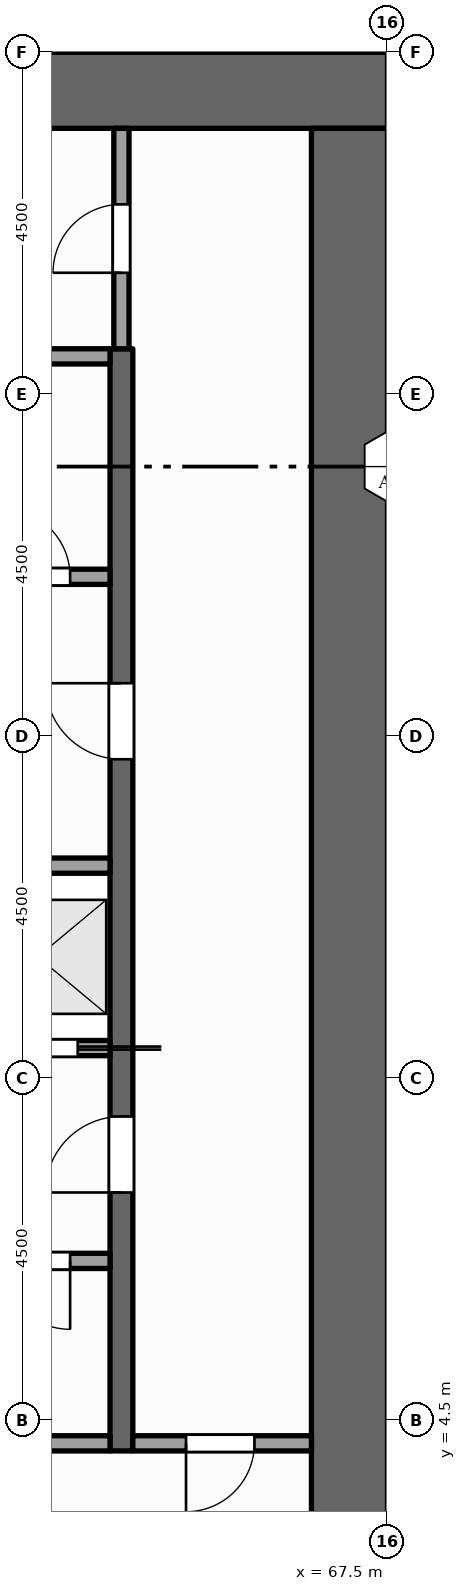
"""IFC4 building model, lengths in metres.
Left out: names, types, materials, properties, quantities, classifications, styles, units other than length and angle.
Written with IfcOpenShell. Run it as: python <this file> out.ifc"""

import sys

from ifc_helpers import new_model, si_unit, direction, frame, frame_2d, origin, place, context, subcontext, project, spatial, rectangle, extrude, element, fill, save


model = new_model("IFC4")
c1 = context("Model", 3, precision=1e-05, world=origin(), true_north=direction((0.0, 1.0)))
c2 = subcontext(c1, "Body", "Model", "MODEL_VIEW")
j1 = project(units=[si_unit("LENGTHUNIT", "METRE"), si_unit("PLANEANGLEUNIT", "RADIAN")], contexts=[c1])
p1 = place(None, origin())
s1 = spatial("IfcSite", under=j1, at=p1, CompositionType="ELEMENT")
p2 = place(p1, origin())
s2 = spatial("IfcBuilding", under=s1, at=p2, CompositionType="ELEMENT")
p3 = place(p2, frame((0.0, 0.0, 239.0)))
s3 = spatial("IfcBuildingStorey", under=s2, at=p3, CompositionType="ELEMENT", Elevation=239.0)
p4 = place(p3, frame((54.0, 22.0, -0.15), z_axis=(0.0, 0.0, 1.0), x_axis=(1.0, 0.0, 0.0)))
e1 = element("IfcWall", 1, at=p4, inside=s3, PredefinedType="SHEAR", context=c2, shape_type="SweptSolid", body=[
    extrude(rectangle(XDim=13.5, YDim=1.0, at=frame_2d((6.75, 0.0))), origin(), (0.0, 0.0, 1.0), 4.0),
])
p5 = place(p3, frame((67.0, 1.0, -0.15), z_axis=(0.0, 0.0, 1.0), x_axis=(0.0, 1.0, 0.0)))
e2 = element("IfcWall", 2, at=p5, inside=s3, PredefinedType="SHEAR", context=c2, shape_type="SweptSolid", body=[
    extrude(rectangle(XDim=20.5, YDim=1.0, at=frame_2d((10.25, 0.0))), origin(), (0.0, 0.0, 1.0), 4.0),
])
p6 = place(p3, frame((64.0, 4.1, 0.0), z_axis=(0.0, 0.0, 1.0), x_axis=(0.0, 1.0, 0.0)))
e3 = element("IfcWall", 3, at=p6, inside=s3, PredefinedType="SHEAR", context=c2, shape_type="SweptSolid", body=[
    extrude(rectangle(XDim=14.5, YDim=0.3, at=frame_2d((7.25, 0.0))), origin(), (0.0, 0.0, 1.0), 3.75),
])
p7 = place(p6, frame((3.4, 0.0, 0.0)))
e4 = element("IfcOpeningElement", 4, at=p7, cuts=e3, PredefinedType="OPENING", context=c2, shape_type="SweptSolid", body=[
    extrude(rectangle(XDim=1.0, YDim=2.1, at=frame_2d((0.5, 1.05))), frame((0.0, 0.16, 0.0), z_axis=(0.0, -1.0, 0.0), x_axis=(1.0, 0.0, 0.0)), (0.0, 0.0, 1.0), 0.32),
])
p8 = place(p6, frame((9.1, 0.0, 0.0)))
e5 = element("IfcOpeningElement", 5, at=p8, cuts=e3, PredefinedType="OPENING", context=c2, shape_type="SweptSolid", body=[
    extrude(rectangle(XDim=1.0, YDim=2.1, at=frame_2d((0.5, 1.05))), frame((0.0, 0.16, 0.0), z_axis=(0.0, -1.0, 0.0), x_axis=(1.0, 0.0, 0.0)), (0.0, 0.0, 1.0), 0.32),
])
p9 = place(p3, frame((64.0, 18.6, 0.0), z_axis=(0.0, 0.0, 1.0), x_axis=(0.0, 1.0, 0.0)))
e6 = element("IfcWall", 6, at=p9, inside=s3, PredefinedType="PARTITIONING", context=c2, shape_type="SweptSolid", body=[
    extrude(rectangle(XDim=2.9, YDim=0.2, at=frame_2d((1.45, 0.0))), origin(), (0.0, 0.0, 1.0), 3.75),
])
p10 = place(p9, frame((1.0, 0.0, 0.0)))
e7 = element("IfcOpeningElement", 7, at=p10, cuts=e6, PredefinedType="OPENING", context=c2, shape_type="SweptSolid", body=[
    extrude(rectangle(XDim=0.9, YDim=2.1, at=frame_2d((0.45, 1.05))), frame((0.0, 0.11, 0.0), z_axis=(0.0, -1.0, 0.0), x_axis=(1.0, 0.0, 0.0)), (0.0, 0.0, 1.0), 0.22),
])
p11 = place(p3, frame((61.9, 4.2, 0.0), z_axis=(0.0, 0.0, 1.0), x_axis=(1.0, 0.0, 0.0)))
e8 = element("IfcWall", 8, at=p11, inside=s3, PredefinedType="PARTITIONING", context=c2, shape_type="SweptSolid", body=[
    extrude(rectangle(XDim=1.95, YDim=0.2, at=frame_2d((0.975, 0.0))), origin(), (0.0, 0.0, 1.0), 3.75),
])
p12 = place(p3, frame((64.15, 4.2, 0.0), z_axis=(0.0, 0.0, 1.0), x_axis=(1.0, 0.0, 0.0)))
e9 = element("IfcWall", 9, at=p12, inside=s3, PredefinedType="PARTITIONING", context=c2, shape_type="SweptSolid", body=[
    extrude(rectangle(XDim=2.35, YDim=0.2, at=frame_2d((1.175, 0.0))), origin(), (0.0, 0.0, 1.0), 3.75),
])
p13 = place(p12, frame((0.7, 0.0, 0.0)))
e10 = element("IfcOpeningElement", 10, at=p13, cuts=e9, PredefinedType="OPENING", context=c2, shape_type="SweptSolid", body=[
    extrude(rectangle(XDim=0.9, YDim=2.1, at=frame_2d((0.45, 1.05))), frame((0.0, 0.11, 0.0), z_axis=(0.0, -1.0, 0.0), x_axis=(1.0, 0.0, 0.0)), (0.0, 0.0, 1.0), 0.22),
])
p14 = place(p3, frame((61.9, 6.6, 0.0), z_axis=(0.0, 0.0, 1.0), x_axis=(1.0, 0.0, 0.0)))
e11 = element("IfcWall", 11, at=p14, inside=s3, PredefinedType="PARTITIONING", context=c2, shape_type="SweptSolid", body=[
    extrude(rectangle(XDim=1.95, YDim=0.2, at=frame_2d((0.975, 0.0))), origin(), (0.0, 0.0, 1.0), 3.75),
])
p15 = place(p14, frame((0.525, 0.0, 0.0)))
e12 = element("IfcOpeningElement", 12, at=p15, cuts=e11, PredefinedType="OPENING", context=c2, shape_type="SweptSolid", body=[
    extrude(rectangle(XDim=0.9, YDim=2.1, at=frame_2d((0.45, 1.05))), frame((0.0, 0.11, 0.0), z_axis=(0.0, -1.0, 0.0), x_axis=(1.0, 0.0, 0.0)), (0.0, 0.0, 1.0), 0.22),
])
p16 = place(p3, frame((61.9, 9.4, 0.0), z_axis=(0.0, 0.0, 1.0), x_axis=(1.0, 0.0, 0.0)))
e13 = element("IfcWall", 13, at=p16, inside=s3, PredefinedType="SOLIDWALL", context=c2, shape_type="SweptSolid", body=[
    extrude(rectangle(XDim=1.95, YDim=0.2, at=frame_2d((0.975, 0.0))), origin(), (0.0, 0.0, 1.0), 3.75),
])
p17 = place(p16, frame((0.425, 0.0, 0.012)))
e14 = element("IfcOpeningElement", 14, at=p17, cuts=e13, PredefinedType="OPENING", context=c2, shape_type="SweptSolid", body=[
    extrude(rectangle(XDim=1.1, YDim=2.1, at=frame_2d((0.55, 1.05))), frame((0.0, 0.11, 0.0), z_axis=(0.0, -1.0, 0.0), x_axis=(1.0, 0.0, 0.0)), (0.0, 0.0, 1.0), 0.22),
])
p18 = place(p3, frame((61.9, 11.8, 0.0), z_axis=(0.0, 0.0, 1.0), x_axis=(1.0, 0.0, 0.0)))
e15 = element("IfcWall", 15, at=p18, inside=s3, PredefinedType="SOLIDWALL", context=c2, shape_type="SweptSolid", body=[
    extrude(rectangle(XDim=1.95, YDim=0.2, at=frame_2d((0.975, 0.0))), origin(), (0.0, 0.0, 1.0), 3.75),
])
p19 = place(p3, frame((61.9, 15.6, 0.0), z_axis=(0.0, 0.0, 1.0), x_axis=(1.0, 0.0, 0.0)))
e16 = element("IfcWall", 16, at=p19, inside=s3, PredefinedType="PARTITIONING", context=c2, shape_type="SweptSolid", body=[
    extrude(rectangle(XDim=1.95, YDim=0.2, at=frame_2d((0.975, 0.0))), origin(), (0.0, 0.0, 1.0), 3.75),
])
p20 = place(p19, frame((0.525, 0.0, 0.0)))
e17 = element("IfcOpeningElement", 17, at=p20, cuts=e16, PredefinedType="OPENING", context=c2, shape_type="SweptSolid", body=[
    extrude(rectangle(XDim=0.9, YDim=2.1, at=frame_2d((0.45, 1.05))), frame((0.0, 0.11, 0.0), z_axis=(0.0, -1.0, 0.0), x_axis=(1.0, 0.0, 0.0)), (0.0, 0.0, 1.0), 0.22),
])
p21 = place(p3, frame((61.9, 18.5, 0.0), z_axis=(0.0, 0.0, 1.0), x_axis=(1.0, 0.0, 0.0)))
e18 = element("IfcWall", 18, at=p21, inside=s3, PredefinedType="PARTITIONING", context=c2, shape_type="SweptSolid", body=[
    extrude(rectangle(XDim=1.95, YDim=0.2, at=frame_2d((0.975, 0.0))), origin(), (0.0, 0.0, 1.0), 3.75),
])
p22 = place(p17, origin())
e19 = element("IfcDoor", 19, at=p22, inside=s3, OperationType="SLIDING_TO_RIGHT", PredefinedType="DOOR", context=c2, shape_type="SweptSolid", body=[
    extrude(rectangle(XDim=1.1, YDim=2.1, at=frame_2d((0.55, 1.05))), frame((0.0, 0.025, 0.0), z_axis=(0.0, -1.0, 0.0), x_axis=(1.0, 0.0, 0.0)), (0.0, 0.0, 1.0), 0.05),
])
fill(e14, e19)
p23 = place(p7, origin())
e20 = element("IfcDoor", 20, at=p23, inside=s3, OperationType="SINGLE_SWING_LEFT", PredefinedType="DOOR", context=c2, shape_type="SweptSolid", body=[
    extrude(rectangle(XDim=1.0, YDim=2.1, at=frame_2d((0.5, 1.05))), frame((0.0, 0.025, 0.0), z_axis=(0.0, -1.0, 0.0), x_axis=(1.0, 0.0, 0.0)), (0.0, 0.0, 1.0), 0.05),
])
fill(e4, e20)
p24 = place(p8, origin())
e21 = element("IfcDoor", 21, at=p24, inside=s3, OperationType="SINGLE_SWING_RIGHT", PredefinedType="DOOR", context=c2, shape_type="SweptSolid", body=[
    extrude(rectangle(XDim=1.0, YDim=2.1, at=frame_2d((0.5, 1.05))), frame((0.0, 0.025, 0.0), z_axis=(0.0, -1.0, 0.0), x_axis=(1.0, 0.0, 0.0)), (0.0, 0.0, 1.0), 0.05),
])
fill(e5, e21)
p25 = place(p13, origin())
e22 = element("IfcDoor", 22, at=p25, inside=s3, OperationType="SINGLE_SWING_LEFT", PredefinedType="DOOR", context=c2, shape_type="SweptSolid", body=[
    extrude(rectangle(XDim=0.9, YDim=2.1, at=frame_2d((0.45, 1.05))), frame((0.0, 0.025, 0.0), z_axis=(0.0, -1.0, 0.0), x_axis=(1.0, 0.0, 0.0)), (0.0, 0.0, 1.0), 0.05),
])
fill(e10, e22)
p26 = place(p10, origin())
e23 = element("IfcDoor", 23, at=p26, inside=s3, OperationType="SINGLE_SWING_LEFT", PredefinedType="DOOR", context=c2, shape_type="SweptSolid", body=[
    extrude(rectangle(XDim=0.9, YDim=2.1, at=frame_2d((0.45, 1.05))), frame((0.0, 0.025, 0.0), z_axis=(0.0, -1.0, 0.0), x_axis=(1.0, 0.0, 0.0)), (0.0, 0.0, 1.0), 0.05),
])
fill(e7, e23)
p27 = place(p15, origin())
e24 = element("IfcDoor", 24, at=p27, inside=s3, OperationType="SINGLE_SWING_RIGHT", PredefinedType="DOOR", context=c2, shape_type="SweptSolid", body=[
    extrude(rectangle(XDim=0.9, YDim=2.1, at=frame_2d((0.45, 1.05))), frame((0.0, 0.025, 0.0), z_axis=(0.0, -1.0, 0.0), x_axis=(1.0, 0.0, 0.0)), (0.0, 0.0, 1.0), 0.05),
])
fill(e12, e24)
p28 = place(p20, origin())
e25 = element("IfcDoor", 25, at=p28, inside=s3, OperationType="SINGLE_SWING_LEFT", PredefinedType="DOOR", context=c2, shape_type="SweptSolid", body=[
    extrude(rectangle(XDim=0.9, YDim=2.1, at=frame_2d((0.45, 1.05))), frame((0.0, 0.025, 0.0), z_axis=(0.0, -1.0, 0.0), x_axis=(1.0, 0.0, 0.0)), (0.0, 0.0, 1.0), 0.05),
])
fill(e17, e25)
save(model, sys.argv[1])
